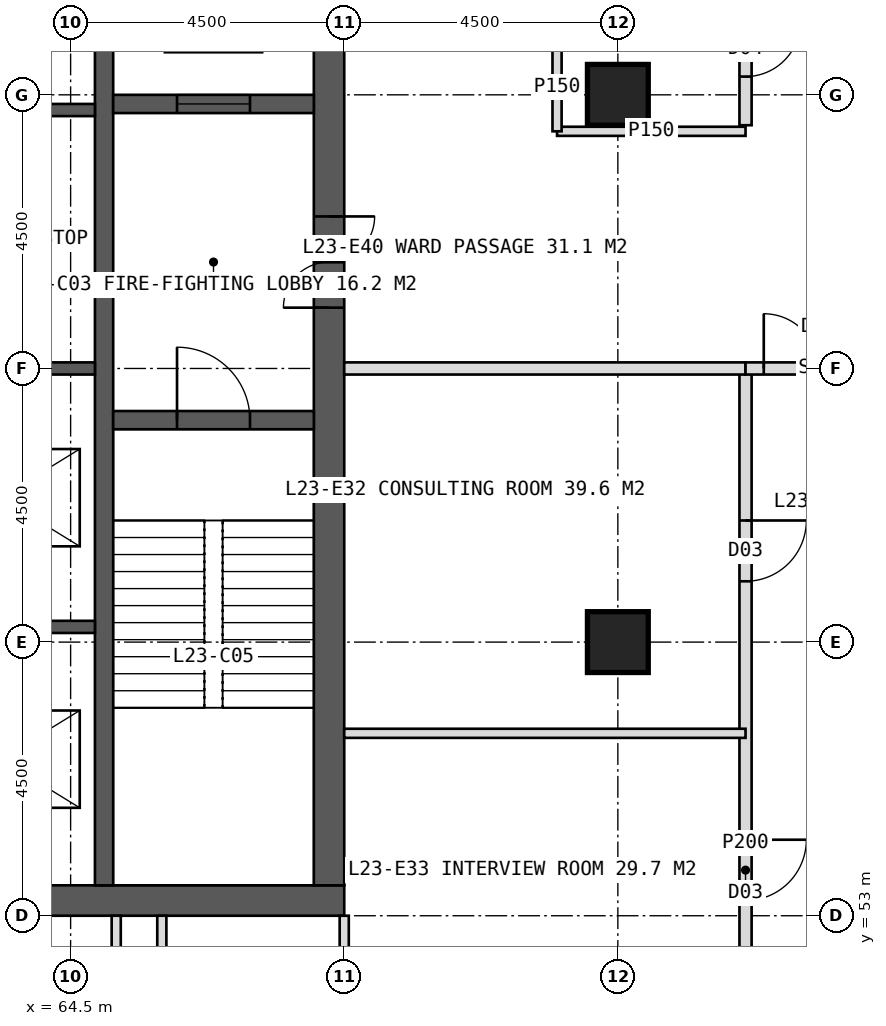
"""IFC4 building model, lengths in metres.
Left out: names, types, materials, properties, quantities, classifications, styles, units other than length and angle.
Written with IfcOpenShell. Run it as: python <this file> out.ifc"""

import sys

from ifc_helpers import new_model, si_unit, direction, frame, frame_2d, origin, origin_2d, place, context, subcontext, project, spatial, rectangle, hollow_rectangle, extrude, element, fill, save


model = new_model("IFC4")
c1 = context("Model", 3, precision=1e-05, world=origin(), true_north=direction((0.0, 1.0)))
c2 = subcontext(c1, "Body", "Model", "MODEL_VIEW")
j1 = project(units=[si_unit("LENGTHUNIT", "METRE"), si_unit("PLANEANGLEUNIT", "RADIAN")], contexts=[c1])
p1 = place(None, origin())
s1 = spatial("IfcSite", under=j1, at=p1, CompositionType="ELEMENT")
p2 = place(p1, origin())
s2 = spatial("IfcBuilding", under=s1, at=p2, CompositionType="ELEMENT")
p3 = place(p2, frame((0.0, 0.0, 100.0)))
s3 = spatial("IfcBuildingStorey", under=s2, at=p3, CompositionType="ELEMENT", Elevation=100.0)
p4 = place(p3, frame((51.0, 53.25, 0.0), z_axis=(0.0, 0.0, 1.0), x_axis=(1.0, 0.0, 0.0)))
e1 = element("IfcWall", 1, at=p4, inside=s3, PredefinedType="SHEAR", context=c2, shape_type="SweptSolid", body=[
    extrude(rectangle(XDim=18.0, YDim=0.5, at=frame_2d((9.0, 0.0))), origin(), (0.0, 0.0, 1.0), 4.0),
])
p5 = place(p4, frame((8.1, 0.0, 0.0)))
e2 = element("IfcOpeningElement", 2, at=p5, cuts=e1, PredefinedType="OPENING", context=c2, shape_type="SweptSolid", body=[
    extrude(rectangle(XDim=1.8, YDim=2.2, at=frame_2d((0.9, 1.1))), frame((0.0, 0.26, 0.0), z_axis=(0.0, -1.0, 0.0), x_axis=(1.0, 0.0, 0.0)), (0.0, 0.0, 1.0), 0.52),
])
p6 = place(p3, frame((68.75, 53.5, 0.0), z_axis=(0.0, 0.0, 1.0), x_axis=(0.0, 1.0, 0.0)))
e3 = element("IfcWall", 3, at=p6, inside=s3, PredefinedType="SHEAR", context=c2, shape_type="SweptSolid", body=[
    extrude(rectangle(XDim=17.0, YDim=0.5, at=frame_2d((8.5, 0.0))), origin(), (0.0, 0.0, 1.0), 4.0),
])
p7 = place(p6, frame((9.5, 0.0, 0.0)))
e4 = element("IfcOpeningElement", 4, at=p7, cuts=e3, PredefinedType="OPENING", context=c2, shape_type="SweptSolid", body=[
    extrude(rectangle(XDim=1.5, YDim=2.2, at=frame_2d((0.75, 1.1))), frame((0.0, 0.26, 0.0), z_axis=(0.0, -1.0, 0.0), x_axis=(1.0, 0.0, 0.0)), (0.0, 0.0, 1.0), 0.52),
])
p8 = place(p3, frame((65.05, 53.5, 0.0), z_axis=(0.0, 0.0, 1.0), x_axis=(0.0, 1.0, 0.0)))
e5 = element("IfcWall", 5, at=p8, inside=s3, PredefinedType="SHEAR", context=c2, shape_type="SweptSolid", body=[
    extrude(rectangle(XDim=17.0, YDim=0.3, at=frame_2d((8.5, 0.0))), origin(), (0.0, 0.0, 1.0), 4.0),
])
for number, where, z_axis, x_axis in (
    (6, (61.85, 57.75, 0.0), (0.0, 0.0, 1.0), (1.0, 0.0, 0.0)),
    (7, (61.85, 62.0, 0.0), (0.0, 0.0, 1.0), (1.0, 0.0, 0.0)),
    (8, (61.85, 66.25, 0.0), (0.0, 0.0, 1.0), (1.0, 0.0, 0.0)),
):
    element("IfcWall", number, at=place(p3, frame(where, z_axis=z_axis, x_axis=x_axis)), inside=s3, PredefinedType="SHEAR", context=c2, shape_type="SweptSolid", body=[
        extrude(rectangle(XDim=3.05, YDim=0.2, at=frame_2d((1.525, 0.0))), origin(), (0.0, 0.0, 1.0), 4.0),
    ])
p9 = place(p3, frame((65.2, 61.15, 0.0), z_axis=(0.0, 0.0, 1.0), x_axis=(1.0, 0.0, 0.0)))
e9 = element("IfcWall", 9, at=p9, inside=s3, PredefinedType="SHEAR", context=c2, shape_type="SweptSolid", body=[
    extrude(rectangle(XDim=3.3, YDim=0.3, at=frame_2d((1.65, 0.0))), origin(), (0.0, 0.0, 1.0), 4.0),
])
p10 = place(p9, frame((1.05, 0.0, 0.0)))
e10 = element("IfcOpeningElement", 10, at=p10, cuts=e9, PredefinedType="OPENING", context=c2, shape_type="SweptSolid", body=[
    extrude(rectangle(XDim=1.2, YDim=2.1, at=frame_2d((0.6, 1.05))), frame((0.0, 0.16, 0.0), z_axis=(0.0, -1.0, 0.0), x_axis=(1.0, 0.0, 0.0)), (0.0, 0.0, 1.0), 0.32),
])
p11 = place(p3, frame((65.2, 66.35, 0.0), z_axis=(0.0, 0.0, 1.0), x_axis=(1.0, 0.0, 0.0)))
e11 = element("IfcWall", 11, at=p11, inside=s3, PredefinedType="SHEAR", context=c2, shape_type="SweptSolid", body=[
    extrude(rectangle(XDim=3.3, YDim=0.3, at=frame_2d((1.65, 0.0))), origin(), (0.0, 0.0, 1.0), 4.0),
])
p12 = place(p11, frame((1.05, 0.0, 0.0)))
e12 = element("IfcOpeningElement", 12, at=p12, cuts=e11, PredefinedType="OPENING", context=c2, shape_type="SweptSolid", body=[
    extrude(rectangle(XDim=1.2, YDim=2.2, at=frame_2d((0.6, 1.1))), frame((0.0, 0.16, 0.0), z_axis=(0.0, -1.0, 0.0), x_axis=(1.0, 0.0, 0.0)), (0.0, 0.0, 1.0), 0.32),
])
for number, where, z_axis, x_axis in (
    (13, (73.5, 57.5, 0.0), (0.0, 0.0, 1.0), (1.0, 0.0, 0.0)),
    (14, (73.5, 66.5, 0.0), (0.0, 0.0, 1.0), (1.0, 0.0, 0.0)),
):
    element("IfcColumn", number, at=place(p3, frame(where, z_axis=z_axis, x_axis=x_axis)), inside=s3, PredefinedType="COLUMN", context=c2, shape_type="SweptSolid", body=[
        extrude(hollow_rectangle(XDim=1.0, YDim=1.0, WallThickness=0.1, at=origin_2d()), origin(), (0.0, 0.0, 1.0), 4.0),
    ])
for number, where, z_axis, x_axis in (
    (15, (69.0, 53.0, 0.0), (0.0, 0.0, 1.0), (0.0, -1.0, 0.0)),
    (16, (66.0, 53.0, 0.0), (0.0, 0.0, 1.0), (0.0, -1.0, 0.0)),
):
    element("IfcWall", number, at=place(p3, frame(where, z_axis=z_axis, x_axis=x_axis)), inside=s3, PredefinedType="PARTITIONING", context=c2, shape_type="SweptSolid", body=[
        extrude(rectangle(XDim=6.6, YDim=0.15, at=frame_2d((3.3, 0.0))), origin(), (0.0, 0.0, 1.0), 3.75),
    ])
p13 = place(p3, frame((65.25, 53.0, 0.0), z_axis=(0.0, 0.0, 1.0), x_axis=(0.0, -1.0, 0.0)))
e17 = element("IfcWall", 17, at=p13, inside=s3, PredefinedType="PARTITIONING", context=c2, shape_type="SweptSolid", body=[
    extrude(rectangle(XDim=2.4, YDim=0.15, at=frame_2d((1.2, 0.0))), origin(), (0.0, 0.0, 1.0), 3.75),
])
p14 = place(p3, frame((75.6, 77.6, 0.0), z_axis=(0.0, 0.0, 1.0), x_axis=(0.0, -1.0, 0.0)))
e18 = element("IfcWall", 18, at=p14, inside=s3, PredefinedType="PARTITIONING", context=c2, shape_type="SweptSolid", body=[
    extrude(rectangle(XDim=11.6, YDim=0.2, at=frame_2d((5.8, 0.0))), origin(), (0.0, 0.0, 1.0), 3.75),
])
p15 = place(p14, frame((7.4, 0.0, 0.0)))
e19 = element("IfcOpeningElement", 19, at=p15, cuts=e18, PredefinedType="OPENING", context=c2, shape_type="SweptSolid", body=[
    extrude(rectangle(XDim=0.9, YDim=2.1, at=frame_2d((0.45, 1.05))), frame((0.0, 0.11, 0.0), z_axis=(0.0, -1.0, 0.0), x_axis=(1.0, 0.0, 0.0)), (0.0, 0.0, 1.0), 0.22),
])
p16 = place(p14, frame((9.9, 0.0, 0.0)))
e20 = element("IfcOpeningElement", 20, at=p16, cuts=e18, PredefinedType="OPENING", context=c2, shape_type="SweptSolid", body=[
    extrude(rectangle(XDim=0.9, YDim=2.1, at=frame_2d((0.45, 1.05))), frame((0.0, 0.11, 0.0), z_axis=(0.0, -1.0, 0.0), x_axis=(1.0, 0.0, 0.0)), (0.0, 0.0, 1.0), 0.22),
])
p17 = place(p3, frame((75.6, 62.0, 0.0), z_axis=(0.0, 0.0, 1.0), x_axis=(0.0, -1.0, 0.0)))
e21 = element("IfcWall", 21, at=p17, inside=s3, PredefinedType="PARTITIONING", context=c2, shape_type="SweptSolid", body=[
    extrude(rectangle(XDim=15.6, YDim=0.2, at=frame_2d((7.8, 0.0))), origin(), (0.0, 0.0, 1.0), 3.75),
])
p18 = place(p17, frame((2.5, 0.0, 0.0)))
e22 = element("IfcOpeningElement", 22, at=p18, cuts=e21, PredefinedType="OPENING", context=c2, shape_type="SweptSolid", body=[
    extrude(rectangle(XDim=1.0, YDim=2.1, at=frame_2d((0.5, 1.05))), frame((0.0, 0.11, 0.0), z_axis=(0.0, -1.0, 0.0), x_axis=(1.0, 0.0, 0.0)), (0.0, 0.0, 1.0), 0.22),
])
p19 = place(p17, frame((7.75, 0.0, 0.0)))
e23 = element("IfcOpeningElement", 23, at=p19, cuts=e21, PredefinedType="OPENING", context=c2, shape_type="SweptSolid", body=[
    extrude(rectangle(XDim=1.0, YDim=2.1, at=frame_2d((0.5, 1.05))), frame((0.0, 0.11, 0.0), z_axis=(0.0, -1.0, 0.0), x_axis=(1.0, 0.0, 0.0)), (0.0, 0.0, 1.0), 0.22),
])
p20 = place(p17, frame((12.55, 0.0, 0.0)))
e24 = element("IfcOpeningElement", 24, at=p20, cuts=e21, PredefinedType="OPENING", context=c2, shape_type="SweptSolid", body=[
    extrude(rectangle(XDim=1.0, YDim=2.1, at=frame_2d((0.5, 1.05))), frame((0.0, 0.11, 0.0), z_axis=(0.0, -1.0, 0.0), x_axis=(1.0, 0.0, 0.0)), (0.0, 0.0, 1.0), 0.22),
])
p21 = place(p3, frame((72.5, 65.9, 0.0), z_axis=(0.0, 0.0, 1.0), x_axis=(1.0, 0.0, 0.0)))
e25 = element("IfcWall", 25, at=p21, inside=s3, PredefinedType="PARTITIONING", context=c2, shape_type="SweptSolid", body=[
    extrude(rectangle(XDim=3.1, YDim=0.15, at=frame_2d((1.55, 0.0))), origin(), (0.0, 0.0, 1.0), 3.75),
])
p22 = place(p3, frame((69.0, 62.0, 0.0), z_axis=(0.0, 0.0, 1.0), x_axis=(1.0, 0.0, 0.0)))
e26 = element("IfcWall", 26, at=p22, inside=s3, PredefinedType="SOLIDWALL", context=c2, shape_type="SweptSolid", body=[
    extrude(rectangle(XDim=6.6, YDim=0.2, at=frame_2d((3.3, 0.0))), origin(), (0.0, 0.0, 1.0), 2.95),
])
p23 = place(p3, frame((69.0, 56.0, 0.0), z_axis=(0.0, 0.0, 1.0), x_axis=(1.0, 0.0, 0.0)))
e27 = element("IfcWall", 27, at=p23, inside=s3, PredefinedType="PARTITIONING", context=c2, shape_type="SweptSolid", body=[
    extrude(rectangle(XDim=6.6, YDim=0.15, at=frame_2d((3.3, 0.0))), origin(), (0.0, 0.0, 1.0), 3.75),
])
p24 = place(p3, frame((75.6, 62.0, 0.0), z_axis=(0.0, 0.0, 1.0), x_axis=(1.0, 0.0, 0.0)))
e28 = element("IfcWall", 28, at=p24, inside=s3, PredefinedType="SOLIDWALL", context=c2, shape_type="SweptSolid", body=[
    extrude(rectangle(XDim=2.7, YDim=0.2, at=frame_2d((1.35, 0.0))), origin(), (0.0, 0.0, 1.0), 2.95),
])
p25 = place(p24, frame((0.3, 0.0, 0.0)))
e29 = element("IfcOpeningElement", 29, at=p25, cuts=e28, PredefinedType="OPENING", context=c2, shape_type="SweptSolid", body=[
    extrude(rectangle(XDim=1.8, YDim=2.2, at=frame_2d((0.9, 1.1))), frame((0.0, 0.11, 0.0), z_axis=(0.0, -1.0, 0.0), x_axis=(1.0, 0.0, 0.0)), (0.0, 0.0, 1.0), 0.22),
])
p26 = place(p3, frame((72.5, 65.9, 0.0), z_axis=(0.0, 0.0, 1.0), x_axis=(0.0, 1.0, 0.0)))
e30 = element("IfcWall", 30, at=p26, inside=s3, PredefinedType="PARTITIONING", context=c2, shape_type="SweptSolid", body=[
    extrude(rectangle(XDim=1.45, YDim=0.15, at=frame_2d((0.725, 0.0))), origin(), (0.0, 0.0, 1.0), 3.75),
])
p27 = place(p16, origin())
e31 = element("IfcDoor", 31, at=p27, inside=s3, OperationType="SINGLE_SWING_LEFT", PredefinedType="DOOR", context=c2, shape_type="SweptSolid", body=[
    extrude(rectangle(XDim=0.9, YDim=2.1, at=frame_2d((0.45, 1.05))), frame((0.0, 0.025, 0.0), z_axis=(0.0, -1.0, 0.0), x_axis=(1.0, 0.0, 0.0)), (0.0, 0.0, 1.0), 0.05),
])
fill(e20, e31)
p28 = place(p18, origin())
e32 = element("IfcDoor", 32, at=p28, inside=s3, OperationType="SINGLE_SWING_LEFT", PredefinedType="DOOR", context=c2, shape_type="SweptSolid", body=[
    extrude(rectangle(XDim=1.0, YDim=2.1, at=frame_2d((0.5, 1.05))), frame((0.0, 0.025, 0.0), z_axis=(0.0, -1.0, 0.0), x_axis=(1.0, 0.0, 0.0)), (0.0, 0.0, 1.0), 0.05),
])
fill(e22, e32)
p29 = place(p19, origin())
e33 = element("IfcDoor", 33, at=p29, inside=s3, OperationType="SINGLE_SWING_LEFT", PredefinedType="DOOR", context=c2, shape_type="SweptSolid", body=[
    extrude(rectangle(XDim=1.0, YDim=2.1, at=frame_2d((0.5, 1.05))), frame((0.0, 0.025, 0.0), z_axis=(0.0, -1.0, 0.0), x_axis=(1.0, 0.0, 0.0)), (0.0, 0.0, 1.0), 0.05),
])
fill(e23, e33)
p30 = place(p25, origin())
e34 = element("IfcDoor", 34, at=p30, inside=s3, OperationType="DOUBLE_DOOR_DOUBLE_SWING", PredefinedType="DOOR", context=c2, shape_type="SweptSolid", body=[
    extrude(rectangle(XDim=1.8, YDim=2.2, at=frame_2d((0.9, 1.1))), frame((0.0, 0.025, 0.0), z_axis=(0.0, -1.0, 0.0), x_axis=(1.0, 0.0, 0.0)), (0.0, 0.0, 1.0), 0.05),
])
fill(e29, e34)
p31 = place(p7, origin())
e35 = element("IfcDoor", 35, at=p31, inside=s3, OperationType="DOUBLE_DOOR_SINGLE_SWING", PredefinedType="DOOR", context=c2, shape_type="SweptSolid", body=[
    extrude(rectangle(XDim=1.5, YDim=2.2, at=frame_2d((0.75, 1.1))), frame((0.0, 0.025, 0.0), z_axis=(0.0, -1.0, 0.0), x_axis=(1.0, 0.0, 0.0)), (0.0, 0.0, 1.0), 0.05),
])
fill(e4, e35)
p32 = place(p10, origin())
e36 = element("IfcDoor", 36, at=p32, inside=s3, OperationType="SINGLE_SWING_LEFT", PredefinedType="DOOR", context=c2, shape_type="SweptSolid", body=[
    extrude(rectangle(XDim=1.2, YDim=2.1, at=frame_2d((0.6, 1.05))), frame((0.0, 0.025, 0.0), z_axis=(0.0, -1.0, 0.0), x_axis=(1.0, 0.0, 0.0)), (0.0, 0.0, 1.0), 0.05),
])
fill(e10, e36)
p33 = place(p12, origin())
e37 = element("IfcDoor", 37, at=p33, inside=s3, OperationType="SLIDING_TO_LEFT", PredefinedType="DOOR", context=c2, shape_type="SweptSolid", body=[
    extrude(rectangle(XDim=1.2, YDim=2.2, at=frame_2d((0.6, 1.1))), frame((0.0, 0.025, 0.0), z_axis=(0.0, -1.0, 0.0), x_axis=(1.0, 0.0, 0.0)), (0.0, 0.0, 1.0), 0.05),
])
fill(e12, e37)
save(model, sys.argv[1])
